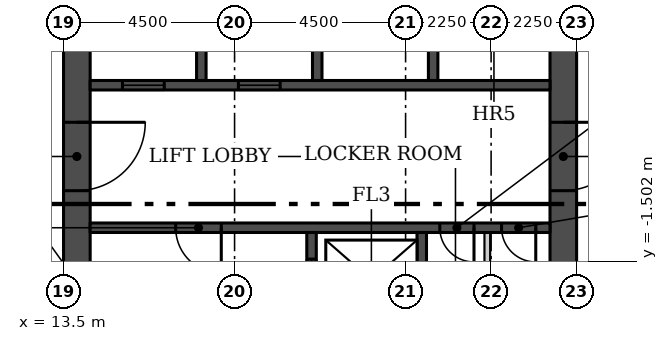
"""IFC4 building model, lengths in metres.
Left out: names, types, materials, properties, quantities, classifications, styles, units other than length and angle.
Written with IfcOpenShell. Run it as: python <this file> out.ifc"""

import sys

from ifc_helpers import new_model, si_unit, direction, frame, frame_2d, origin, place, context, subcontext, project, spatial, rectangle, extrude, element, fill, save


model = new_model("IFC4")
c1 = context("Model", 3, precision=1e-05, world=origin(), true_north=direction((0.0, 1.0)))
c2 = subcontext(c1, "Body", "Model", "MODEL_VIEW")
j1 = project(units=[si_unit("LENGTHUNIT", "METRE"), si_unit("PLANEANGLEUNIT", "RADIAN")], contexts=[c1])
p1 = place(None, origin())
s1 = spatial("IfcSite", under=j1, at=p1, CompositionType="ELEMENT")
p2 = place(p1, origin())
s2 = spatial("IfcBuilding", under=s1, at=p2, CompositionType="ELEMENT")
p3 = place(p2, frame((0.0, 0.0, 12.5)))
s3 = spatial("IfcBuildingStorey", under=s2, at=p3, CompositionType="ELEMENT", Elevation=12.5)
p4 = place(p3, frame((13.85, 6.05, 0.0), z_axis=(0.0, 0.0, 1.0), x_axis=(0.0, -1.0, 0.0)))
e1 = element("IfcWall", 1, at=p4, inside=s3, PredefinedType="SHEAR", context=c2, shape_type="SweptSolid", body=[
    extrude(rectangle(XDim=12.1, YDim=0.7, at=frame_2d((6.05, 0.0))), origin(), (0.0, 0.0, 1.0), 5.6),
])
p5 = place(p4, frame((3.9, 0.0, 0.0)))
e2 = element("IfcOpeningElement", 2, at=p5, cuts=e1, PredefinedType="OPENING", context=c2, shape_type="SweptSolid", body=[
    extrude(rectangle(XDim=1.8, YDim=2.4, at=frame_2d((0.9, 1.2))), frame((0.0, 0.36, 0.0), z_axis=(0.0, -1.0, 0.0), x_axis=(1.0, 0.0, 0.0)), (0.0, 0.0, 1.0), 0.72),
])
p6 = place(p3, frame((26.65, 6.05, 0.0), z_axis=(0.0, 0.0, 1.0), x_axis=(0.0, -1.0, 0.0)))
e3 = element("IfcWall", 3, at=p6, inside=s3, PredefinedType="SHEAR", context=c2, shape_type="SweptSolid", body=[
    extrude(rectangle(XDim=12.1, YDim=0.7, at=frame_2d((6.05, 0.0))), origin(), (0.0, 0.0, 1.0), 5.6),
])
p7 = place(p6, frame((10.1, 0.0, 0.0)))
e4 = element("IfcOpeningElement", 4, at=p7, cuts=e3, PredefinedType="OPENING", context=c2, shape_type="SweptSolid", body=[
    extrude(rectangle(XDim=1.2, YDim=2.1, at=frame_2d((0.6, 1.05))), frame((0.0, 0.36, 0.0), z_axis=(0.0, -1.0, 0.0), x_axis=(1.0, 0.0, 0.0)), (0.0, 0.0, 1.0), 0.72),
])
p8 = place(p6, frame((3.9, 0.0, 0.0)))
e5 = element("IfcOpeningElement", 5, at=p8, cuts=e3, PredefinedType="OPENING", context=c2, shape_type="SweptSolid", body=[
    extrude(rectangle(XDim=1.8, YDim=2.4, at=frame_2d((0.9, 1.2))), frame((0.0, 0.36, 0.0), z_axis=(0.0, -1.0, 0.0), x_axis=(1.0, 0.0, 0.0)), (0.0, 0.0, 1.0), 0.72),
])
p9 = place(p3, frame((26.3, -0.625, 0.0), z_axis=(0.0, 0.0, 1.0), x_axis=(-1.0, 0.0, 0.0)))
e6 = element("IfcWall", 6, at=p9, inside=s3, PredefinedType="SHEAR", context=c2, shape_type="SweptSolid", body=[
    extrude(rectangle(XDim=12.1, YDim=0.25, at=frame_2d((6.05, 0.0))), origin(), (0.0, 0.0, 1.0), 5.6),
])
p10 = place(p9, frame((8.65, 0.0, 0.0)))
e7 = element("IfcOpeningElement", 7, at=p10, cuts=e6, PredefinedType="OPENING", context=c2, shape_type="SweptSolid", body=[
    extrude(rectangle(XDim=1.2, YDim=2.1, at=frame_2d((0.6, 1.05))), frame((0.0, 0.135, 0.0), z_axis=(0.0, -1.0, 0.0), x_axis=(1.0, 0.0, 0.0)), (0.0, 0.0, 1.0), 0.27),
])
p11 = place(p9, frame((2.0, 0.0, 0.0)))
e8 = element("IfcOpeningElement", 8, at=p11, cuts=e6, PredefinedType="OPENING", context=c2, shape_type="SweptSolid", body=[
    extrude(rectangle(XDim=0.9, YDim=2.1, at=frame_2d((0.45, 1.05))), frame((0.0, 0.135, 0.0), z_axis=(0.0, -1.0, 0.0), x_axis=(1.0, 0.0, 0.0)), (0.0, 0.0, 1.0), 0.27),
])
p12 = place(p9, frame((0.375, 0.0, 0.0)))
e9 = element("IfcOpeningElement", 9, at=p12, cuts=e6, PredefinedType="OPENING", context=c2, shape_type="SweptSolid", body=[
    extrude(rectangle(XDim=0.9, YDim=2.1, at=frame_2d((0.45, 1.05))), frame((0.0, 0.135, 0.0), z_axis=(0.0, -1.0, 0.0), x_axis=(1.0, 0.0, 0.0)), (0.0, 0.0, 1.0), 0.27),
])
p13 = place(p3, frame((20.025, -3.25, 0.0), z_axis=(0.0, 0.0, 1.0), x_axis=(0.0, 1.0, 0.0)))
e10 = element("IfcWall", 10, at=p13, inside=s3, PredefinedType="SHEAR", context=c2, shape_type="SweptSolid", body=[
    extrude(rectangle(XDim=2.5, YDim=0.25, at=frame_2d((1.25, 0.0))), origin(), (0.0, 0.0, 1.0), 5.6),
])
p14 = place(p13, frame((0.7, 0.0, 0.0)))
e11 = element("IfcOpeningElement", 11, at=p14, cuts=e10, PredefinedType="OPENING", context=c2, shape_type="SweptSolid", body=[
    extrude(rectangle(XDim=1.1, YDim=2.1, at=frame_2d((0.55, 1.05))), frame((0.0, 0.135, 0.0), z_axis=(0.0, -1.0, 0.0), x_axis=(1.0, 0.0, 0.0)), (0.0, 0.0, 1.0), 0.27),
])
p15 = place(p3, frame((22.925, -3.25, 0.0), z_axis=(0.0, 0.0, 1.0), x_axis=(0.0, 1.0, 0.0)))
e12 = element("IfcWall", 12, at=p15, inside=s3, PredefinedType="SHEAR", context=c2, shape_type="SweptSolid", body=[
    extrude(rectangle(XDim=2.5, YDim=0.25, at=frame_2d((1.25, 0.0))), origin(), (0.0, 0.0, 1.0), 5.6),
])
p16 = place(p3, frame((24.65, -3.25, 0.0), z_axis=(0.0, 0.0, 1.0), x_axis=(0.0, 1.0, 0.0)))
e13 = element("IfcWall", 13, at=p16, inside=s3, PredefinedType="PARTITIONING", context=c2, shape_type="SweptSolid", body=[
    extrude(rectangle(XDim=2.5, YDim=0.15, at=frame_2d((1.25, 0.0))), origin(), (0.0, 0.0, 1.0), 5.6),
])
p17 = place(p3, frame((14.2, 3.125, 0.0)))
e14 = element("IfcWall", 14, at=p17, inside=s3, PredefinedType="SHEAR", context=c2, shape_type="SweptSolid", body=[
    extrude(rectangle(XDim=12.1, YDim=0.25, at=frame_2d((6.05, 0.0))), origin(), (0.0, 0.0, 1.0), 5.6),
])
p18 = place(p17, frame((0.85, 0.0, 0.0)))
e15 = element("IfcOpeningElement", 15, at=p18, cuts=e14, PredefinedType="OPENING", context=c2, shape_type="SweptSolid", body=[
    extrude(rectangle(XDim=1.1, YDim=2.1, at=frame_2d((0.55, 1.05))), frame((0.0, 0.135, 0.0), z_axis=(0.0, -1.0, 0.0), x_axis=(1.0, 0.0, 0.0)), (0.0, 0.0, 1.0), 0.27),
])
p19 = place(p17, frame((3.9, 0.0, 0.0)))
e16 = element("IfcOpeningElement", 16, at=p19, cuts=e14, PredefinedType="OPENING", context=c2, shape_type="SweptSolid", body=[
    extrude(rectangle(XDim=1.1, YDim=2.1, at=frame_2d((0.55, 1.05))), frame((0.0, 0.135, 0.0), z_axis=(0.0, -1.0, 0.0), x_axis=(1.0, 0.0, 0.0)), (0.0, 0.0, 1.0), 0.27),
])
for number, where, z_axis, x_axis in (
    (17, (17.125, 3.25, 0.0), (0.0, 0.0, 1.0), (0.0, 1.0, 0.0)),
    (18, (20.175, 3.25, 0.0), (0.0, 0.0, 1.0), (0.0, 1.0, 0.0)),
    (19, (23.225, 3.25, 0.0), (0.0, 0.0, 1.0), (0.0, 1.0, 0.0)),
):
    element("IfcWall", number, at=place(p3, frame(where, z_axis=z_axis, x_axis=x_axis)), inside=s3, PredefinedType="SHEAR", context=c2, shape_type="SweptSolid", body=[
        extrude(rectangle(XDim=2.8, YDim=0.25, at=frame_2d((1.4, 0.0))), origin(), (0.0, 0.0, 1.0), 5.6),
    ])
p20 = place(p5, origin())
e20 = element("IfcDoor", 20, at=p20, inside=s3, OperationType="DOUBLE_DOOR_SINGLE_SWING", PredefinedType="DOOR", context=c2, shape_type="SweptSolid", body=[
    extrude(rectangle(XDim=1.8, YDim=2.4, at=frame_2d((0.9, 1.2))), frame((0.0, 0.025, 0.0), z_axis=(0.0, -1.0, 0.0), x_axis=(1.0, 0.0, 0.0)), (0.0, 0.0, 1.0), 0.05),
])
fill(e2, e20)
p21 = place(p8, origin())
e21 = element("IfcDoor", 21, at=p21, inside=s3, OperationType="DOUBLE_DOOR_SINGLE_SWING", PredefinedType="DOOR", context=c2, shape_type="SweptSolid", body=[
    extrude(rectangle(XDim=1.8, YDim=2.4, at=frame_2d((0.9, 1.2))), frame((0.0, 0.025, 0.0), z_axis=(0.0, -1.0, 0.0), x_axis=(1.0, 0.0, 0.0)), (0.0, 0.0, 1.0), 0.05),
])
fill(e5, e21)
p22 = place(p10, origin())
e22 = element("IfcDoor", 22, at=p22, inside=s3, OperationType="SINGLE_SWING_RIGHT", PredefinedType="DOOR", context=c2, shape_type="SweptSolid", body=[
    extrude(rectangle(XDim=1.2, YDim=2.1, at=frame_2d((0.6, 1.05))), frame((0.0, 0.025, 0.0), z_axis=(0.0, -1.0, 0.0), x_axis=(1.0, 0.0, 0.0)), (0.0, 0.0, 1.0), 0.05),
])
fill(e7, e22)
p23 = place(p11, origin())
e23 = element("IfcDoor", 23, at=p23, inside=s3, OperationType="SINGLE_SWING_LEFT", PredefinedType="DOOR", context=c2, shape_type="SweptSolid", body=[
    extrude(rectangle(XDim=0.9, YDim=2.1, at=frame_2d((0.45, 1.05))), frame((0.0, 0.025, 0.0), z_axis=(0.0, -1.0, 0.0), x_axis=(1.0, 0.0, 0.0)), (0.0, 0.0, 1.0), 0.05),
])
fill(e8, e23)
p24 = place(p12, origin())
e24 = element("IfcDoor", 24, at=p24, inside=s3, OperationType="SINGLE_SWING_LEFT", PredefinedType="DOOR", context=c2, shape_type="SweptSolid", body=[
    extrude(rectangle(XDim=0.9, YDim=2.1, at=frame_2d((0.45, 1.05))), frame((0.0, 0.025, 0.0), z_axis=(0.0, -1.0, 0.0), x_axis=(1.0, 0.0, 0.0)), (0.0, 0.0, 1.0), 0.05),
])
fill(e9, e24)
p25 = place(p14, origin())
e25 = element("IfcDoor", 25, at=p25, inside=s3, OperationType="SLIDING_TO_LEFT", PredefinedType="DOOR", context=c2, shape_type="SweptSolid", body=[
    extrude(rectangle(XDim=1.1, YDim=2.1, at=frame_2d((0.55, 1.05))), frame((0.0, 0.025, 0.0), z_axis=(0.0, -1.0, 0.0), x_axis=(1.0, 0.0, 0.0)), (0.0, 0.0, 1.0), 0.05),
])
fill(e11, e25)
p26 = place(p18, origin())
e26 = element("IfcDoor", 26, at=p26, inside=s3, OperationType="SLIDING_TO_LEFT", PredefinedType="DOOR", context=c2, shape_type="SweptSolid", body=[
    extrude(rectangle(XDim=1.1, YDim=2.1, at=frame_2d((0.55, 1.05))), frame((0.0, 0.025, 0.0), z_axis=(0.0, -1.0, 0.0), x_axis=(1.0, 0.0, 0.0)), (0.0, 0.0, 1.0), 0.05),
])
fill(e15, e26)
p27 = place(p19, origin())
e27 = element("IfcDoor", 27, at=p27, inside=s3, OperationType="SLIDING_TO_LEFT", PredefinedType="DOOR", context=c2, shape_type="SweptSolid", body=[
    extrude(rectangle(XDim=1.1, YDim=2.1, at=frame_2d((0.55, 1.05))), frame((0.0, 0.025, 0.0), z_axis=(0.0, -1.0, 0.0), x_axis=(1.0, 0.0, 0.0)), (0.0, 0.0, 1.0), 0.05),
])
fill(e16, e27)
save(model, sys.argv[1])
